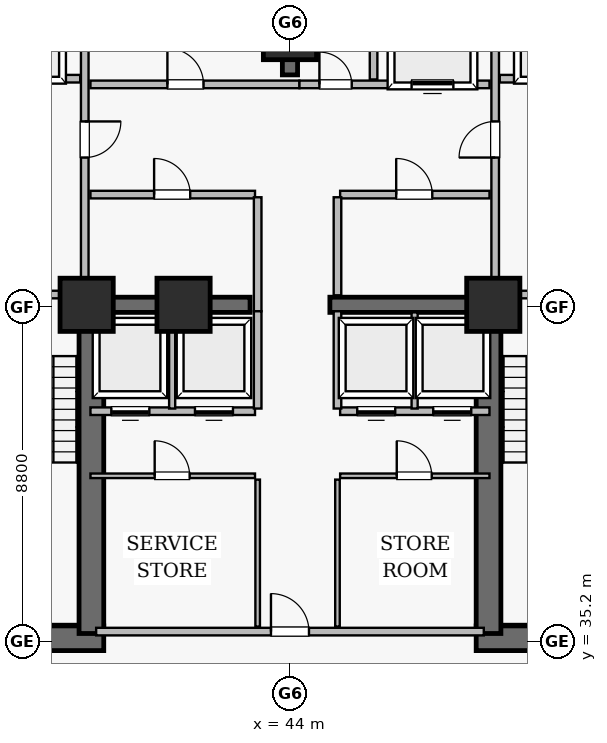
"""IFC4 building model, lengths in metres.
Left out: names, types, materials, properties, quantities, classifications, styles, units other than length and angle.
Written with IfcOpenShell. Run it as: python <this file> out.ifc"""

import sys

from ifc_helpers import new_model, si_unit, direction, frame, frame_2d, origin, origin_2d, place, context, subcontext, project, spatial, rectangle, extrude, element, fill, save


model = new_model("IFC4")
c1 = context("Model", 3, precision=1e-05, world=origin(), true_north=direction((0.0, 1.0)))
c2 = subcontext(c1, "Body", "Model", "MODEL_VIEW")
j1 = project(units=[si_unit("LENGTHUNIT", "METRE"), si_unit("PLANEANGLEUNIT", "RADIAN")], contexts=[c1])
p1 = place(None, origin())
s1 = spatial("IfcSite", under=j1, at=p1, CompositionType="ELEMENT")
p2 = place(p1, origin())
s2 = spatial("IfcBuilding", under=s1, at=p2, CompositionType="ELEMENT")
p3 = place(p2, frame((0.0, 0.0, -15.6)))
s3 = spatial("IfcBuildingStorey", under=s2, at=p3, CompositionType="ELEMENT", Elevation=-15.6)
for number, where, z_axis, x_axis in (
    (1, (34.95, 35.275, 0.0), (0.0, 0.0, 1.0), (1.0, 0.0, 0.0)),
    (2, (48.9, 35.275, 0.0), (0.0, 0.0, 1.0), (1.0, 0.0, 0.0)),
):
    element("IfcWall", number, at=place(p3, frame(where, z_axis=z_axis, x_axis=x_axis)), inside=s3, PredefinedType="SHEAR", context=c2, shape_type="SweptSolid", body=[
        extrude(rectangle(XDim=4.15, YDim=0.65, at=frame_2d((2.075, 0.0))), origin(), (0.0, 0.0, 1.0), 3.58),
    ])
for number, where, z_axis, x_axis in (
    (3, (38.775, 35.4, 0.0), (0.0, 0.0, 1.0), (0.0, 1.0, 0.0)),
    (4, (49.225, 35.4, 0.0), (0.0, 0.0, 1.0), (0.0, 1.0, 0.0)),
):
    element("IfcWall", number, at=place(p3, frame(where, z_axis=z_axis, x_axis=x_axis)), inside=s3, PredefinedType="SHEAR", context=c2, shape_type="SweptSolid", body=[
        extrude(rectangle(XDim=8.95, YDim=0.65, at=frame_2d((4.475, 0.0))), origin(), (0.0, 0.0, 1.0), 3.58),
    ])
p4 = place(p3, frame((44.0, 50.1, 0.0), z_axis=(0.0, 0.0, 1.0), x_axis=(0.0, 1.0, 0.0)))
e5 = element("IfcWall", 5, at=p4, inside=s3, PredefinedType="SHEAR", context=c2, shape_type="SweptSolid", body=[
    extrude(rectangle(XDim=2.1, YDim=0.4, at=frame_2d((1.05, 0.0))), origin(), (0.0, 0.0, 1.0), 3.58),
])
for number, where, z_axis, x_axis in (
    (6, (38.75, 44.05, 0.0), (0.0, 0.0, 1.0), (1.0, 0.0, 0.0)),
    (7, (45.05, 44.05, 0.0), (0.0, 0.0, 1.0), (1.0, 0.0, 0.0)),
):
    element("IfcWall", number, at=place(p3, frame(where, z_axis=z_axis, x_axis=x_axis)), inside=s3, PredefinedType="SHEAR", context=c2, shape_type="SweptSolid", body=[
        extrude(rectangle(XDim=4.2, YDim=0.4, at=frame_2d((2.1, 0.0))), origin(), (0.0, 0.0, 1.0), 3.58),
    ])
for number, where, z_axis, x_axis in (
    (8, (38.65, 44.05, 0.0), (0.0, 0.0, 1.0), (1.0, 0.0, 0.0)),
    (9, (49.35, 44.05, 0.0), (0.0, 0.0, 1.0), (1.0, 0.0, 0.0)),
    (10, (44.0, 51.2, 0.0), (0.0, 0.0, 1.0), (1.0, 0.0, 0.0)),
    (11, (41.2, 44.05, 0.0), (0.0, 0.0, 1.0), (1.0, 0.0, 0.0)),
):
    element("IfcColumn", number, at=place(p3, frame(where, z_axis=z_axis, x_axis=x_axis)), inside=s3, PredefinedType="COLUMN", context=c2, shape_type="SweptSolid", body=[
        extrude(rectangle(XDim=1.4, YDim=1.4, at=origin_2d()), origin(), (0.0, 0.0, 1.0), 3.9),
    ])
p5 = place(p3, frame((38.9, 35.45, 0.0), z_axis=(0.0, 0.0, 1.0), x_axis=(1.0, 0.0, 0.0)))
e12 = element("IfcWall", 12, at=p5, inside=s3, PredefinedType="SOLIDWALL", context=c2, shape_type="SweptSolid", body=[
    extrude(rectangle(XDim=10.2, YDim=0.2, at=frame_2d((5.1, 0.0))), origin(), (0.0, 0.0, 1.0), 3.58),
])
p6 = place(p5, frame((4.6, 0.0, 0.0)))
e13 = element("IfcOpeningElement", 13, at=p6, cuts=e12, PredefinedType="OPENING", context=c2, shape_type="SweptSolid", body=[
    extrude(rectangle(XDim=1.0, YDim=2.15, at=frame_2d((0.5, 1.075))), frame((0.0, 0.11, 0.0), z_axis=(0.0, -1.0, 0.0), x_axis=(1.0, 0.0, 0.0)), (0.0, 0.0, 1.0), 0.22),
])
p7 = place(p3, frame((38.6, 44.5, 0.0), z_axis=(0.0, 0.0, 1.0), x_axis=(0.0, 1.0, 0.0)))
e14 = element("IfcWall", 14, at=p7, inside=s3, PredefinedType="SOLIDWALL", context=c2, shape_type="SweptSolid", body=[
    extrude(rectangle(XDim=7.92, YDim=0.2, at=frame_2d((3.96, 0.0))), origin(), (0.0, 0.0, 1.0), 3.58),
])
p8 = place(p7, frame((3.425, 0.0, 0.0)))
e15 = element("IfcOpeningElement", 15, at=p8, cuts=e14, PredefinedType="OPENING", context=c2, shape_type="SweptSolid", body=[
    extrude(rectangle(XDim=0.95, YDim=2.15, at=frame_2d((0.475, 1.075))), frame((0.0, 0.11, 0.0), z_axis=(0.0, -1.0, 0.0), x_axis=(1.0, 0.0, 0.0)), (0.0, 0.0, 1.0), 0.22),
])
p9 = place(p3, frame((49.4, 44.5, 0.0), z_axis=(0.0, 0.0, 1.0), x_axis=(0.0, 1.0, 0.0)))
e16 = element("IfcWall", 16, at=p9, inside=s3, PredefinedType="SOLIDWALL", context=c2, shape_type="SweptSolid", body=[
    extrude(rectangle(XDim=7.92, YDim=0.2, at=frame_2d((3.96, 0.0))), origin(), (0.0, 0.0, 1.0), 3.58),
])
p10 = place(p9, frame((3.425, 0.0, 0.0)))
e17 = element("IfcOpeningElement", 17, at=p10, cuts=e16, PredefinedType="OPENING", context=c2, shape_type="SweptSolid", body=[
    extrude(rectangle(XDim=0.95, YDim=2.15, at=frame_2d((0.475, 1.075))), frame((0.0, 0.11, 0.0), z_axis=(0.0, -1.0, 0.0), x_axis=(1.0, 0.0, 0.0)), (0.0, 0.0, 1.0), 0.22),
])
p11 = place(p3, frame((38.75, 49.85, 0.0), z_axis=(0.0, 0.0, 1.0), x_axis=(1.0, 0.0, 0.0)))
e18 = element("IfcWall", 18, at=p11, inside=s3, PredefinedType="SOLIDWALL", context=c2, shape_type="SweptSolid", body=[
    extrude(rectangle(XDim=5.5, YDim=0.2, at=frame_2d((2.75, 0.0))), origin(), (0.0, 0.0, 1.0), 3.58),
])
p12 = place(p11, frame((2.025, 0.0, 0.0)))
e19 = element("IfcOpeningElement", 19, at=p12, cuts=e18, PredefinedType="OPENING", context=c2, shape_type="SweptSolid", body=[
    extrude(rectangle(XDim=0.95, YDim=2.15, at=frame_2d((0.475, 1.075))), frame((0.0, 0.11, 0.0), z_axis=(0.0, -1.0, 0.0), x_axis=(1.0, 0.0, 0.0)), (0.0, 0.0, 1.0), 0.22),
])
p13 = place(p3, frame((44.25, 49.85, 0.0), z_axis=(0.0, 0.0, 1.0), x_axis=(1.0, 0.0, 0.0)))
e20 = element("IfcWall", 20, at=p13, inside=s3, PredefinedType="SOLIDWALL", context=c2, shape_type="SweptSolid", body=[
    extrude(rectangle(XDim=5.0, YDim=0.2, at=frame_2d((2.5, 0.0))), origin(), (0.0, 0.0, 1.0), 2.918),
])
p14 = place(p13, frame((0.525, 0.0, 0.0)))
e21 = element("IfcOpeningElement", 21, at=p14, cuts=e20, PredefinedType="OPENING", context=c2, shape_type="SweptSolid", body=[
    extrude(rectangle(XDim=0.85, YDim=2.1, at=frame_2d((0.425, 1.05))), frame((0.0, 0.11, 0.0), z_axis=(0.0, -1.0, 0.0), x_axis=(1.0, 0.0, 0.0)), (0.0, 0.0, 1.0), 0.22),
])
p15 = place(p13, frame((2.95, 0.0, 0.0)))
e22 = element("IfcOpeningElement", 22, at=p15, cuts=e20, PredefinedType="OPENING", context=c2, shape_type="SweptSolid", body=[
    extrude(rectangle(XDim=1.1, YDim=2.15, at=frame_2d((0.55, 1.075))), frame((0.0, 0.11, 0.0), z_axis=(0.0, -1.0, 0.0), x_axis=(1.0, 0.0, 0.0)), (0.0, 0.0, 1.0), 0.22),
])
p16 = place(p3, frame((38.75, 46.95, 0.0), z_axis=(0.0, 0.0, 1.0), x_axis=(1.0, 0.0, 0.0)))
e23 = element("IfcWall", 23, at=p16, inside=s3, PredefinedType="SOLIDWALL", context=c2, shape_type="SweptSolid", body=[
    extrude(rectangle(XDim=4.33, YDim=0.2, at=frame_2d((2.165, 0.0))), origin(), (0.0, 0.0, 1.0), 3.58),
])
p17 = place(p16, frame((1.675, 0.0, 0.0)))
e24 = element("IfcOpeningElement", 24, at=p17, cuts=e23, PredefinedType="OPENING", context=c2, shape_type="SweptSolid", body=[
    extrude(rectangle(XDim=0.95, YDim=2.15, at=frame_2d((0.475, 1.075))), frame((0.0, 0.11, 0.0), z_axis=(0.0, -1.0, 0.0), x_axis=(1.0, 0.0, 0.0)), (0.0, 0.0, 1.0), 0.22),
])
p18 = place(p3, frame((38.75, 41.25, 0.0), z_axis=(0.0, 0.0, 1.0), x_axis=(1.0, 0.0, 0.0)))
e25 = element("IfcWall", 25, at=p18, inside=s3, PredefinedType="SOLIDWALL", context=c2, shape_type="SweptSolid", body=[
    extrude(rectangle(XDim=4.33, YDim=0.2, at=frame_2d((2.165, 0.0))), origin(), (0.0, 0.0, 1.0), 3.58),
])
p19 = place(p18, frame((0.55, 0.0, 0.0)))
e26 = element("IfcOpeningElement", 26, at=p19, cuts=e25, PredefinedType="OPENING", context=c2, shape_type="SweptSolid", body=[
    extrude(rectangle(XDim=1.0, YDim=2.15, at=frame_2d((0.5, 1.075))), frame((0.0, 0.11, 0.0), z_axis=(0.0, -1.0, 0.0), x_axis=(1.0, 0.0, 0.0)), (0.0, 0.0, 1.0), 0.22),
])
p20 = place(p18, frame((2.75, 0.0, 0.0)))
e27 = element("IfcOpeningElement", 27, at=p20, cuts=e25, PredefinedType="OPENING", context=c2, shape_type="SweptSolid", body=[
    extrude(rectangle(XDim=1.0, YDim=2.15, at=frame_2d((0.5, 1.075))), frame((0.0, 0.11, 0.0), z_axis=(0.0, -1.0, 0.0), x_axis=(1.0, 0.0, 0.0)), (0.0, 0.0, 1.0), 0.22),
])
p21 = place(p3, frame((38.75, 39.55, 0.0), z_axis=(0.0, 0.0, 1.0), x_axis=(1.0, 0.0, 0.0)))
e28 = element("IfcWall", 28, at=p21, inside=s3, PredefinedType="PARTITIONING", context=c2, shape_type="SweptSolid", body=[
    extrude(rectangle(XDim=4.33, YDim=0.12, at=frame_2d((2.165, 0.0))), origin(), (0.0, 0.0, 1.0), 3.58),
])
p22 = place(p21, frame((1.69, 0.0, 0.0)))
e29 = element("IfcOpeningElement", 29, at=p22, cuts=e28, PredefinedType="OPENING", context=c2, shape_type="SweptSolid", body=[
    extrude(rectangle(XDim=0.92, YDim=2.1, at=frame_2d((0.46, 1.05))), frame((0.0, 0.07, 0.0), z_axis=(0.0, -1.0, 0.0), x_axis=(1.0, 0.0, 0.0)), (0.0, 0.0, 1.0), 0.14),
])
p23 = place(p3, frame((45.32, 46.95, 0.0), z_axis=(0.0, 0.0, 1.0), x_axis=(1.0, 0.0, 0.0)))
e30 = element("IfcWall", 30, at=p23, inside=s3, PredefinedType="SOLIDWALL", context=c2, shape_type="SweptSolid", body=[
    extrude(rectangle(XDim=3.93, YDim=0.2, at=frame_2d((1.965, 0.0))), origin(), (0.0, 0.0, 1.0), 2.918),
])
p24 = place(p23, frame((1.475, 0.0, 0.0)))
e31 = element("IfcOpeningElement", 31, at=p24, cuts=e30, PredefinedType="OPENING", context=c2, shape_type="SweptSolid", body=[
    extrude(rectangle(XDim=0.95, YDim=2.15, at=frame_2d((0.475, 1.075))), frame((0.0, 0.11, 0.0), z_axis=(0.0, -1.0, 0.0), x_axis=(1.0, 0.0, 0.0)), (0.0, 0.0, 1.0), 0.22),
])
p25 = place(p3, frame((45.32, 41.25, 0.0), z_axis=(0.0, 0.0, 1.0), x_axis=(1.0, 0.0, 0.0)))
e32 = element("IfcWall", 32, at=p25, inside=s3, PredefinedType="SOLIDWALL", context=c2, shape_type="SweptSolid", body=[
    extrude(rectangle(XDim=3.93, YDim=0.2, at=frame_2d((1.965, 0.0))), origin(), (0.0, 0.0, 1.0), 3.58),
])
p26 = place(p25, frame((0.45, 0.0, 0.0)))
e33 = element("IfcOpeningElement", 33, at=p26, cuts=e32, PredefinedType="OPENING", context=c2, shape_type="SweptSolid", body=[
    extrude(rectangle(XDim=1.0, YDim=2.15, at=frame_2d((0.5, 1.075))), frame((0.0, 0.11, 0.0), z_axis=(0.0, -1.0, 0.0), x_axis=(1.0, 0.0, 0.0)), (0.0, 0.0, 1.0), 0.22),
])
p27 = place(p25, frame((2.45, 0.0, 0.0)))
e34 = element("IfcOpeningElement", 34, at=p27, cuts=e32, PredefinedType="OPENING", context=c2, shape_type="SweptSolid", body=[
    extrude(rectangle(XDim=1.0, YDim=2.15, at=frame_2d((0.5, 1.075))), frame((0.0, 0.11, 0.0), z_axis=(0.0, -1.0, 0.0), x_axis=(1.0, 0.0, 0.0)), (0.0, 0.0, 1.0), 0.22),
])
p28 = place(p3, frame((45.32, 39.55, 0.0), z_axis=(0.0, 0.0, 1.0), x_axis=(1.0, 0.0, 0.0)))
e35 = element("IfcWall", 35, at=p28, inside=s3, PredefinedType="PARTITIONING", context=c2, shape_type="SweptSolid", body=[
    extrude(rectangle(XDim=3.93, YDim=0.12, at=frame_2d((1.965, 0.0))), origin(), (0.0, 0.0, 1.0), 3.58),
])
p29 = place(p28, frame((1.49, 0.0, 0.0)))
e36 = element("IfcOpeningElement", 36, at=p29, cuts=e35, PredefinedType="OPENING", context=c2, shape_type="SweptSolid", body=[
    extrude(rectangle(XDim=0.92, YDim=2.1, at=frame_2d((0.46, 1.05))), frame((0.0, 0.07, 0.0), z_axis=(0.0, -1.0, 0.0), x_axis=(1.0, 0.0, 0.0)), (0.0, 0.0, 1.0), 0.14),
])
p30 = place(p3, frame((35.65, 44.32, 0.0), z_axis=(0.0, 0.0, 1.0), x_axis=(1.0, 0.0, 0.0)))
e37 = element("IfcWall", 37, at=p30, inside=s3, PredefinedType="SOLIDWALL", context=c2, shape_type="SweptSolid", body=[
    extrude(rectangle(XDim=2.8, YDim=0.2, at=frame_2d((1.4, 0.0))), origin(), (0.0, 0.0, 1.0), 3.58),
])
p31 = place(p30, frame((0.9, 0.0, 0.0)))
e38 = element("IfcOpeningElement", 38, at=p31, cuts=e37, PredefinedType="OPENING", context=c2, shape_type="SweptSolid", body=[
    extrude(rectangle(XDim=1.0, YDim=2.15, at=frame_2d((0.5, 1.075))), frame((0.0, 0.11, 0.0), z_axis=(0.0, -1.0, 0.0), x_axis=(1.0, 0.0, 0.0)), (0.0, 0.0, 1.0), 0.22),
])
p32 = place(p3, frame((49.55, 44.32, 0.0), z_axis=(0.0, 0.0, 1.0), x_axis=(1.0, 0.0, 0.0)))
e39 = element("IfcWall", 39, at=p32, inside=s3, PredefinedType="SOLIDWALL", context=c2, shape_type="SweptSolid", body=[
    extrude(rectangle(XDim=2.8, YDim=0.2, at=frame_2d((1.4, 0.0))), origin(), (0.0, 0.0, 1.0), 3.58),
])
p33 = place(p32, frame((0.9, 0.0, 0.0)))
e40 = element("IfcOpeningElement", 40, at=p33, cuts=e39, PredefinedType="OPENING", context=c2, shape_type="SweptSolid", body=[
    extrude(rectangle(XDim=1.0, YDim=2.15, at=frame_2d((0.5, 1.075))), frame((0.0, 0.11, 0.0), z_axis=(0.0, -1.0, 0.0), x_axis=(1.0, 0.0, 0.0)), (0.0, 0.0, 1.0), 0.22),
])
p34 = place(p3, frame((35.68, 50.0, 0.0), z_axis=(0.0, 0.0, 1.0), x_axis=(1.0, 0.0, 0.0)))
e41 = element("IfcWall", 41, at=p34, inside=s3, PredefinedType="SOLIDWALL", context=c2, shape_type="SweptSolid", body=[
    extrude(rectangle(XDim=2.8, YDim=0.2, at=frame_2d((1.4, 0.0))), origin(), (0.0, 0.0, 1.0), 3.58),
])
p35 = place(p34, frame((0.85, 0.0, 0.0)))
e42 = element("IfcOpeningElement", 42, at=p35, cuts=e41, PredefinedType="OPENING", context=c2, shape_type="SweptSolid", body=[
    extrude(rectangle(XDim=1.1, YDim=2.15, at=frame_2d((0.55, 1.075))), frame((0.0, 0.11, 0.0), z_axis=(0.0, -1.0, 0.0), x_axis=(1.0, 0.0, 0.0)), (0.0, 0.0, 1.0), 0.22),
])
p36 = place(p3, frame((49.52, 50.0, 0.0), z_axis=(0.0, 0.0, 1.0), x_axis=(1.0, 0.0, 0.0)))
e43 = element("IfcWall", 43, at=p36, inside=s3, PredefinedType="SOLIDWALL", context=c2, shape_type="SweptSolid", body=[
    extrude(rectangle(XDim=2.8, YDim=0.2, at=frame_2d((1.4, 0.0))), origin(), (0.0, 0.0, 1.0), 3.58),
])
p37 = place(p36, frame((0.85, 0.0, 0.0)))
e44 = element("IfcOpeningElement", 44, at=p37, cuts=e43, PredefinedType="OPENING", context=c2, shape_type="SweptSolid", body=[
    extrude(rectangle(XDim=1.1, YDim=2.15, at=frame_2d((0.55, 1.075))), frame((0.0, 0.11, 0.0), z_axis=(0.0, -1.0, 0.0), x_axis=(1.0, 0.0, 0.0)), (0.0, 0.0, 1.0), 0.22),
])
for number, where, z_axis, x_axis in (
    (45, (43.15, 35.58, 0.0), (0.0, 0.0, 1.0), (0.0, 1.0, 0.0)),
    (46, (45.25, 35.58, 0.0), (0.0, 0.0, 1.0), (0.0, 1.0, 0.0)),
):
    element("IfcWall", number, at=place(p3, frame(where, z_axis=z_axis, x_axis=x_axis)), inside=s3, PredefinedType="PARTITIONING", context=c2, shape_type="SweptSolid", body=[
        extrude(rectangle(XDim=3.87, YDim=0.12, at=frame_2d((1.935, 0.0))), origin(), (0.0, 0.0, 1.0), 3.58),
    ])
p38 = place(p3, frame((43.15, 43.88, 0.0), z_axis=(0.0, 0.0, 1.0), x_axis=(0.0, 1.0, 0.0)))
e47 = element("IfcWall", 47, at=p38, inside=s3, PredefinedType="SOLIDWALL", context=c2, shape_type="SweptSolid", body=[
    extrude(rectangle(XDim=3.0, YDim=0.2, at=frame_2d((1.5, 0.0))), origin(), (0.0, 0.0, 1.0), 3.58),
])
p39 = place(p3, frame((45.25, 44.3, 0.0), z_axis=(0.0, 0.0, 1.0), x_axis=(0.0, 1.0, 0.0)))
e48 = element("IfcWall", 48, at=p39, inside=s3, PredefinedType="SOLIDWALL", context=c2, shape_type="SweptSolid", body=[
    extrude(rectangle(XDim=2.58, YDim=0.2, at=frame_2d((1.29, 0.0))), origin(), (0.0, 0.0, 1.0), 3.58),
])
for number, where, z_axis, x_axis in (
    (49, (43.15, 41.32, 0.0), (0.0, 0.0, 1.0), (0.0, 1.0, 0.0)),
    (50, (45.25, 41.32, 0.0), (0.0, 0.0, 1.0), (0.0, 1.0, 0.0)),
):
    element("IfcWall", number, at=place(p3, frame(where, z_axis=z_axis, x_axis=x_axis)), inside=s3, PredefinedType="SOLIDWALL", context=c2, shape_type="SweptSolid", body=[
        extrude(rectangle(XDim=2.56, YDim=0.2, at=frame_2d((1.28, 0.0))), origin(), (0.0, 0.0, 1.0), 3.58),
    ])
for number, where, z_axis, x_axis in (
    (51, (40.9, 41.32, 0.0), (0.0, 0.0, 1.0), (0.0, 1.0, 0.0)),
    (52, (47.28, 41.32, 0.0), (0.0, 0.0, 1.0), (0.0, 1.0, 0.0)),
):
    element("IfcWall", number, at=place(p3, frame(where, z_axis=z_axis, x_axis=x_axis)), inside=s3, PredefinedType="SOLIDWALL", context=c2, shape_type="SweptSolid", body=[
        extrude(rectangle(XDim=2.53, YDim=0.16, at=frame_2d((1.265, 0.0))), origin(), (0.0, 0.0, 1.0), 3.58),
    ])
p40 = place(p3, frame((46.2, 49.98, 0.0), z_axis=(0.0, 0.0, 1.0), x_axis=(0.0, 1.0, 0.0)))
e53 = element("IfcWall", 53, at=p40, inside=s3, PredefinedType="SOLIDWALL", context=c2, shape_type="SweptSolid", body=[
    extrude(rectangle(XDim=2.37, YDim=0.2, at=frame_2d((1.185, 0.0))), origin(), (0.0, 0.0, 1.0), 3.58),
])
p41 = place(p8, frame((0.95, 0.0, 0.0), z_axis=(0.0, 0.0, 1.0), x_axis=(-1.0, 0.0, 0.0)))
e54 = element("IfcDoor", 54, at=p41, inside=s3, OperationType="SINGLE_SWING_RIGHT", PredefinedType="DOOR", context=c2, shape_type="SweptSolid", body=[
    extrude(rectangle(XDim=0.95, YDim=2.15, at=frame_2d((0.475, 1.075))), frame((0.0, 0.025, 0.0), z_axis=(0.0, -1.0, 0.0), x_axis=(1.0, 0.0, 0.0)), (0.0, 0.0, 1.0), 0.05),
])
fill(e15, e54)
p42 = place(p10, origin())
e55 = element("IfcDoor", 55, at=p42, inside=s3, OperationType="SINGLE_SWING_LEFT", PredefinedType="DOOR", context=c2, shape_type="SweptSolid", body=[
    extrude(rectangle(XDim=0.95, YDim=2.15, at=frame_2d((0.475, 1.075))), frame((0.0, 0.025, 0.0), z_axis=(0.0, -1.0, 0.0), x_axis=(1.0, 0.0, 0.0)), (0.0, 0.0, 1.0), 0.05),
])
fill(e17, e55)
p43 = place(p6, origin())
e56 = element("IfcDoor", 56, at=p43, inside=s3, OperationType="SINGLE_SWING_LEFT", PredefinedType="DOOR", context=c2, shape_type="SweptSolid", body=[
    extrude(rectangle(XDim=1.0, YDim=2.15, at=frame_2d((0.5, 1.075))), frame((0.0, 0.025, 0.0), z_axis=(0.0, -1.0, 0.0), x_axis=(1.0, 0.0, 0.0)), (0.0, 0.0, 1.0), 0.05),
])
fill(e13, e56)
p44 = place(p12, origin())
e57 = element("IfcDoor", 57, at=p44, inside=s3, OperationType="SINGLE_SWING_LEFT", PredefinedType="DOOR", context=c2, shape_type="SweptSolid", body=[
    extrude(rectangle(XDim=0.95, YDim=2.15, at=frame_2d((0.475, 1.075))), frame((0.0, 0.025, 0.0), z_axis=(0.0, -1.0, 0.0), x_axis=(1.0, 0.0, 0.0)), (0.0, 0.0, 1.0), 0.05),
])
fill(e19, e57)
p45 = place(p14, origin())
e58 = element("IfcDoor", 58, at=p45, inside=s3, OperationType="SINGLE_SWING_LEFT", PredefinedType="DOOR", context=c2, shape_type="SweptSolid", body=[
    extrude(rectangle(XDim=0.85, YDim=2.1, at=frame_2d((0.425, 1.05))), frame((0.0, 0.025, 0.0), z_axis=(0.0, -1.0, 0.0), x_axis=(1.0, 0.0, 0.0)), (0.0, 0.0, 1.0), 0.05),
])
fill(e21, e58)
p46 = place(p15, origin())
e59 = element("IfcDoor", 59, at=p46, inside=s3, OperationType="SLIDING_TO_LEFT", PredefinedType="DOOR", context=c2, shape_type="SweptSolid", body=[
    extrude(rectangle(XDim=1.1, YDim=2.15, at=frame_2d((0.55, 1.075))), frame((0.0, 0.025, 0.0), z_axis=(0.0, -1.0, 0.0), x_axis=(1.0, 0.0, 0.0)), (0.0, 0.0, 1.0), 0.05),
])
fill(e22, e59)
p47 = place(p17, origin())
e60 = element("IfcDoor", 60, at=p47, inside=s3, OperationType="SINGLE_SWING_LEFT", PredefinedType="DOOR", context=c2, shape_type="SweptSolid", body=[
    extrude(rectangle(XDim=0.95, YDim=2.15, at=frame_2d((0.475, 1.075))), frame((0.0, 0.025, 0.0), z_axis=(0.0, -1.0, 0.0), x_axis=(1.0, 0.0, 0.0)), (0.0, 0.0, 1.0), 0.05),
])
fill(e24, e60)
p48 = place(p24, origin())
e61 = element("IfcDoor", 61, at=p48, inside=s3, OperationType="SINGLE_SWING_LEFT", PredefinedType="DOOR", context=c2, shape_type="SweptSolid", body=[
    extrude(rectangle(XDim=0.95, YDim=2.15, at=frame_2d((0.475, 1.075))), frame((0.0, 0.025, 0.0), z_axis=(0.0, -1.0, 0.0), x_axis=(1.0, 0.0, 0.0)), (0.0, 0.0, 1.0), 0.05),
])
fill(e31, e61)
p49 = place(p19, frame((1.0, 0.0, 0.0), z_axis=(0.0, 0.0, 1.0), x_axis=(-1.0, 0.0, 0.0)))
e62 = element("IfcDoor", 62, at=p49, inside=s3, OperationType="SLIDING_TO_LEFT", PredefinedType="DOOR", context=c2, shape_type="SweptSolid", body=[
    extrude(rectangle(XDim=1.0, YDim=2.15, at=frame_2d((0.5, 1.075))), frame((0.0, 0.025, 0.0), z_axis=(0.0, -1.0, 0.0), x_axis=(1.0, 0.0, 0.0)), (0.0, 0.0, 1.0), 0.05),
])
fill(e26, e62)
p50 = place(p20, frame((1.0, 0.0, 0.0), z_axis=(0.0, 0.0, 1.0), x_axis=(-1.0, 0.0, 0.0)))
e63 = element("IfcDoor", 63, at=p50, inside=s3, OperationType="SLIDING_TO_LEFT", PredefinedType="DOOR", context=c2, shape_type="SweptSolid", body=[
    extrude(rectangle(XDim=1.0, YDim=2.15, at=frame_2d((0.5, 1.075))), frame((0.0, 0.025, 0.0), z_axis=(0.0, -1.0, 0.0), x_axis=(1.0, 0.0, 0.0)), (0.0, 0.0, 1.0), 0.05),
])
fill(e27, e63)
p51 = place(p26, frame((1.0, 0.0, 0.0), z_axis=(0.0, 0.0, 1.0), x_axis=(-1.0, 0.0, 0.0)))
e64 = element("IfcDoor", 64, at=p51, inside=s3, OperationType="SLIDING_TO_LEFT", PredefinedType="DOOR", context=c2, shape_type="SweptSolid", body=[
    extrude(rectangle(XDim=1.0, YDim=2.15, at=frame_2d((0.5, 1.075))), frame((0.0, 0.025, 0.0), z_axis=(0.0, -1.0, 0.0), x_axis=(1.0, 0.0, 0.0)), (0.0, 0.0, 1.0), 0.05),
])
fill(e33, e64)
p52 = place(p27, frame((1.0, 0.0, 0.0), z_axis=(0.0, 0.0, 1.0), x_axis=(-1.0, 0.0, 0.0)))
e65 = element("IfcDoor", 65, at=p52, inside=s3, OperationType="SLIDING_TO_LEFT", PredefinedType="DOOR", context=c2, shape_type="SweptSolid", body=[
    extrude(rectangle(XDim=1.0, YDim=2.15, at=frame_2d((0.5, 1.075))), frame((0.0, 0.025, 0.0), z_axis=(0.0, -1.0, 0.0), x_axis=(1.0, 0.0, 0.0)), (0.0, 0.0, 1.0), 0.05),
])
fill(e34, e65)
p53 = place(p22, origin())
e66 = element("IfcDoor", 66, at=p53, inside=s3, OperationType="SINGLE_SWING_LEFT", PredefinedType="DOOR", context=c2, shape_type="SweptSolid", body=[
    extrude(rectangle(XDim=0.92, YDim=2.1, at=frame_2d((0.46, 1.05))), frame((0.0, 0.025, 0.0), z_axis=(0.0, -1.0, 0.0), x_axis=(1.0, 0.0, 0.0)), (0.0, 0.0, 1.0), 0.05),
])
fill(e29, e66)
p54 = place(p29, origin())
e67 = element("IfcDoor", 67, at=p54, inside=s3, OperationType="SINGLE_SWING_LEFT", PredefinedType="DOOR", context=c2, shape_type="SweptSolid", body=[
    extrude(rectangle(XDim=0.92, YDim=2.1, at=frame_2d((0.46, 1.05))), frame((0.0, 0.025, 0.0), z_axis=(0.0, -1.0, 0.0), x_axis=(1.0, 0.0, 0.0)), (0.0, 0.0, 1.0), 0.05),
])
fill(e36, e67)
save(model, sys.argv[1])
